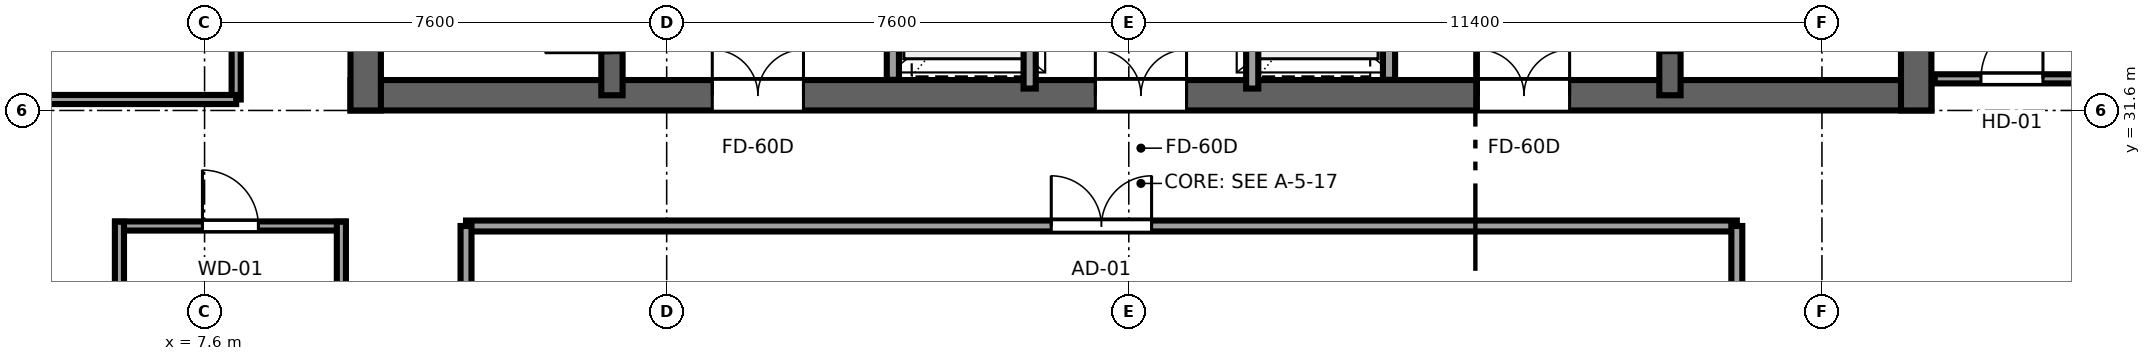
"""IFC4 building model, lengths in metres.
Left out: names, types, materials, properties, quantities, classifications, styles, units other than length and angle.
Written with IfcOpenShell. Run it as: python <this file> out.ifc"""

import sys

from ifc_helpers import new_model, si_unit, direction, frame, frame_2d, origin, place, context, subcontext, project, spatial, rectangle, extrude, source, transform, mapped, element, fill, save


model = new_model("IFC4")
c1 = context("Model", 3, precision=1e-05, world=origin(), true_north=direction((0.0, 1.0)))
c2 = subcontext(c1, "Body", "Model", "MODEL_VIEW")
j1 = project(units=[si_unit("LENGTHUNIT", "METRE"), si_unit("PLANEANGLEUNIT", "RADIAN")], contexts=[c1])
p1 = place(None, origin())
s1 = spatial("IfcSite", under=j1, at=p1, CompositionType="ELEMENT")
p2 = place(p1, origin())
s2 = spatial("IfcBuilding", under=s1, at=p2, CompositionType="ELEMENT")
p3 = place(p2, frame((0.0, 0.0, 262.95)))
s3 = spatial("IfcBuildingStorey", under=s2, at=p3, CompositionType="ELEMENT", Elevation=262.95)
p4 = place(p3, frame((10.0, 31.85, 0.0), z_axis=(0.0, 0.0, 1.0), x_axis=(1.0, 0.0, 0.0)))
e1 = element("IfcWall", 1, at=p4, inside=s3, PredefinedType="SHEAR", context=c2, shape_type="SweptSolid", body=[
    extrude(rectangle(XDim=26.0, YDim=0.5, at=frame_2d((13.0, 0.0))), origin(), (0.0, 0.0, 1.0), 3.55),
])
p5 = place(p4, frame((7.45, 0.0, 0.0), z_axis=(0.0, 0.0, 1.0), x_axis=(-1.0, 0.0, 0.0)))
e2 = element("IfcOpeningElement", 2, at=p5, cuts=e1, PredefinedType="OPENING", context=c2, shape_type="SweptSolid", body=[
    extrude(rectangle(XDim=1.5, YDim=2.04, at=frame_2d((0.75, 1.02))), frame((0.0, 0.26, 0.0), z_axis=(0.0, -1.0, 0.0), x_axis=(1.0, 0.0, 0.0)), (0.0, 0.0, 1.0), 0.52),
])
p6 = place(p4, frame((13.75, 0.0, 0.0), z_axis=(0.0, 0.0, 1.0), x_axis=(-1.0, 0.0, 0.0)))
e3 = element("IfcOpeningElement", 3, at=p6, cuts=e1, PredefinedType="OPENING", context=c2, shape_type="SweptSolid", body=[
    extrude(rectangle(XDim=1.5, YDim=2.04, at=frame_2d((0.75, 1.02))), frame((0.0, 0.26, 0.0), z_axis=(0.0, -1.0, 0.0), x_axis=(1.0, 0.0, 0.0)), (0.0, 0.0, 1.0), 0.52),
])
p7 = place(p4, frame((20.05, 0.0, 0.0), z_axis=(0.0, 0.0, 1.0), x_axis=(-1.0, 0.0, 0.0)))
e4 = element("IfcOpeningElement", 4, at=p7, cuts=e1, PredefinedType="OPENING", context=c2, shape_type="SweptSolid", body=[
    extrude(rectangle(XDim=1.5, YDim=2.04, at=frame_2d((0.75, 1.02))), frame((0.0, 0.26, 0.0), z_axis=(0.0, -1.0, 0.0), x_axis=(1.0, 0.0, 0.0)), (0.0, 0.0, 1.0), 0.52),
])
for number, where, z_axis, x_axis in (
    (5, (10.25, 31.6, 0.0), (0.0, 0.0, 1.0), (0.0, 1.0, 0.0)),
    (6, (35.75, 31.6, 0.0), (0.0, 0.0, 1.0), (0.0, 1.0, 0.0)),
):
    element("IfcWall", number, at=place(p3, frame(where, z_axis=z_axis, x_axis=x_axis)), inside=s3, PredefinedType="SHEAR", context=c2, shape_type="SweptSolid", body=[
        extrude(rectangle(XDim=13.6, YDim=0.5, at=frame_2d((6.8, 0.0))), origin(), (0.0, 0.0, 1.0), 3.55),
    ])
p8 = place(p3, frame((14.3, 31.85, 0.0), z_axis=(0.0, 0.0, 1.0), x_axis=(0.0, 1.0, 0.0)))
e7 = element("IfcWall", 7, at=p8, inside=s3, PredefinedType="SHEAR", context=c2, shape_type="SweptSolid", body=[
    extrude(rectangle(XDim=13.1, YDim=0.35, at=frame_2d((6.55, 0.0))), origin(), (0.0, 0.0, 1.0), 3.55),
])
p9 = place(p8, frame((0.7, 0.0, 0.0)))
e8 = element("IfcOpeningElement", 8, at=p9, cuts=e7, PredefinedType="OPENING", context=c2, shape_type="SweptSolid", body=[
    extrude(rectangle(XDim=1.1, YDim=2.12, at=frame_2d((0.55, 1.06))), frame((0.0, 0.185, 0.0), z_axis=(0.0, -1.0, 0.0), x_axis=(1.0, 0.0, 0.0)), (0.0, 0.0, 1.0), 0.37),
])
p10 = place(p3, frame((31.7, 31.85, 0.0), z_axis=(0.0, 0.0, 1.0), x_axis=(0.0, 1.0, 0.0)))
e9 = element("IfcWall", 9, at=p10, inside=s3, PredefinedType="SHEAR", context=c2, shape_type="SweptSolid", body=[
    extrude(rectangle(XDim=13.1, YDim=0.35, at=frame_2d((6.55, 0.0))), origin(), (0.0, 0.0, 1.0), 3.55),
])
p11 = place(p10, frame((1.8, 0.0, 0.0), z_axis=(0.0, 0.0, 1.0), x_axis=(-1.0, 0.0, 0.0)))
e10 = element("IfcOpeningElement", 10, at=p11, cuts=e9, PredefinedType="OPENING", context=c2, shape_type="SweptSolid", body=[
    extrude(rectangle(XDim=1.1, YDim=2.12, at=frame_2d((0.55, 1.06))), frame((0.0, 0.185, 0.0), z_axis=(0.0, -1.0, 0.0), x_axis=(1.0, 0.0, 0.0)), (0.0, 0.0, 1.0), 0.37),
])
for number, where, z_axis, x_axis in (
    (11, (18.92, 32.104, 0.0), (0.0, 0.0, 1.0), (0.0, 1.0, 0.0)),
    (12, (27.08, 32.104, 0.0), (0.0, 0.0, 1.0), (0.0, 1.0, 0.0)),
):
    element("IfcWall", number, at=place(p3, frame(where, z_axis=z_axis, x_axis=x_axis)), inside=s3, PredefinedType="SOLIDWALL", context=c2, shape_type="SweptSolid", body=[
        extrude(rectangle(XDim=4.046, YDim=0.2, at=frame_2d((2.023, 0.0))), origin(), (0.0, 0.0, 1.0), 3.37),
    ])
p12 = place(p3, frame((21.17, 31.96, 0.0), z_axis=(0.0, 0.0, 1.0), x_axis=(0.0, 1.0, 0.0)))
e13 = element("IfcWall", 13, at=p12, inside=s3, PredefinedType="SOLIDWALL", context=c2, shape_type="SweptSolid", body=[
    extrude(rectangle(XDim=5.08, YDim=0.2, at=frame_2d((2.54, 0.0))), origin(), (0.0, 0.0, 1.0), 3.37),
])
p13 = place(p12, frame((0.74, 0.0, 0.0)))
e14 = element("IfcOpeningElement", 14, at=p13, cuts=e13, PredefinedType="OPENING", context=c2, shape_type="SweptSolid", body=[
    extrude(rectangle(XDim=1.1, YDim=2.12, at=frame_2d((0.55, 1.06))), frame((0.0, 0.11, 0.0), z_axis=(0.0, -1.0, 0.0), x_axis=(1.0, 0.0, 0.0)), (0.0, 0.0, 1.0), 0.22),
])
p14 = place(p12, frame((3.24, 0.0, 0.0)))
e15 = element("IfcOpeningElement", 15, at=p14, cuts=e13, PredefinedType="OPENING", context=c2, shape_type="SweptSolid", body=[
    extrude(rectangle(XDim=1.1, YDim=2.12, at=frame_2d((0.55, 1.06))), frame((0.0, 0.11, 0.0), z_axis=(0.0, -1.0, 0.0), x_axis=(1.0, 0.0, 0.0)), (0.0, 0.0, 1.0), 0.22),
])
p15 = place(p3, frame((24.83, 31.96, 0.0), z_axis=(0.0, 0.0, 1.0), x_axis=(0.0, 1.0, 0.0)))
e16 = element("IfcWall", 16, at=p15, inside=s3, PredefinedType="SOLIDWALL", context=c2, shape_type="SweptSolid", body=[
    extrude(rectangle(XDim=5.08, YDim=0.2, at=frame_2d((2.54, 0.0))), origin(), (0.0, 0.0, 1.0), 3.37),
])
p16 = place(p15, frame((0.74, 0.0, 0.0)))
e17 = element("IfcOpeningElement", 17, at=p16, cuts=e16, PredefinedType="OPENING", context=c2, shape_type="SweptSolid", body=[
    extrude(rectangle(XDim=1.1, YDim=2.12, at=frame_2d((0.55, 1.06))), frame((0.0, 0.11, 0.0), z_axis=(0.0, -1.0, 0.0), x_axis=(1.0, 0.0, 0.0)), (0.0, 0.0, 1.0), 0.22),
])
p17 = place(p15, frame((3.24, 0.0, 0.0)))
e18 = element("IfcOpeningElement", 18, at=p17, cuts=e16, PredefinedType="OPENING", context=c2, shape_type="SweptSolid", body=[
    extrude(rectangle(XDim=1.1, YDim=2.12, at=frame_2d((0.55, 1.06))), frame((0.0, 0.11, 0.0), z_axis=(0.0, -1.0, 0.0), x_axis=(1.0, 0.0, 0.0)), (0.0, 0.0, 1.0), 0.22),
])
p18 = place(p3, frame((11.9, 29.7, 0.0), z_axis=(0.0, 0.0, 1.0), x_axis=(1.0, 0.0, 0.0)))
e19 = element("IfcWall", 19, at=p18, inside=s3, PredefinedType="PARTITIONING", context=c2, shape_type="SweptSolid", body=[
    extrude(rectangle(XDim=20.9, YDim=0.18, at=frame_2d((10.45, 0.0))), origin(), (0.0, 0.0, 1.0), 3.37),
])
p19 = place(p18, frame((9.625, 0.0, 0.0)))
e20 = element("IfcOpeningElement", 20, at=p19, cuts=e19, PredefinedType="OPENING", context=c2, shape_type="SweptSolid", body=[
    extrude(rectangle(XDim=1.65, YDim=2.15, at=frame_2d((0.825, 1.075))), frame((0.0, 0.1, 0.0), z_axis=(0.0, -1.0, 0.0), x_axis=(1.0, 0.0, 0.0)), (0.0, 0.0, 1.0), 0.2),
])
p20 = place(p3, frame((11.9, 26.2, 0.0), z_axis=(0.0, 0.0, 1.0), x_axis=(0.0, 1.0, 0.0)))
e21 = element("IfcWall", 21, at=p20, inside=s3, PredefinedType="PARTITIONING", context=c2, shape_type="SweptSolid", body=[
    extrude(rectangle(XDim=3.5, YDim=0.18, at=frame_2d((1.75, 0.0))), origin(), (0.0, 0.0, 1.0), 3.37),
])
p21 = place(p3, frame((32.8, 26.2, 0.0), z_axis=(0.0, 0.0, 1.0), x_axis=(0.0, 1.0, 0.0)))
e22 = element("IfcWall", 22, at=p21, inside=s3, PredefinedType="PARTITIONING", context=c2, shape_type="SweptSolid", body=[
    extrude(rectangle(XDim=3.5, YDim=0.18, at=frame_2d((1.75, 0.0))), origin(), (0.0, 0.0, 1.0), 2.827),
])
p22 = place(p3, frame((6.13, 29.7, 0.0), z_axis=(0.0, 0.0, 1.0), x_axis=(1.0, 0.0, 0.0)))
e23 = element("IfcWall", 23, at=p22, inside=s3, PredefinedType="PARTITIONING", context=c2, shape_type="SweptSolid", body=[
    extrude(rectangle(XDim=3.79, YDim=0.15, at=frame_2d((1.895, 0.0))), origin(), (0.0, 0.0, 1.0), 3.37),
])
p23 = place(p22, frame((1.435, 0.0, 0.0)))
e24 = element("IfcOpeningElement", 24, at=p23, cuts=e23, PredefinedType="OPENING", context=c2, shape_type="SweptSolid", body=[
    extrude(rectangle(XDim=0.92, YDim=2.01, at=frame_2d((0.46, 1.005))), frame((0.0, 0.085, 0.0), z_axis=(0.0, -1.0, 0.0), x_axis=(1.0, 0.0, 0.0)), (0.0, 0.0, 1.0), 0.17),
])
for number, where, z_axis, x_axis in (
    (25, (6.2, 26.43, 0.0), (0.0, 0.0, 1.0), (0.0, 1.0, 0.0)),
    (26, (9.85, 26.43, 0.0), (0.0, 0.0, 1.0), (0.0, 1.0, 0.0)),
):
    element("IfcWall", number, at=place(p3, frame(where, z_axis=z_axis, x_axis=x_axis)), inside=s3, PredefinedType="PARTITIONING", context=c2, shape_type="SweptSolid", body=[
        extrude(rectangle(XDim=3.34, YDim=0.15, at=frame_2d((1.67, 0.0))), origin(), (0.0, 0.0, 1.0), 3.37),
    ])
p24 = place(p3, frame((8.12, 31.78, 0.0), z_axis=(0.0, 0.0, 1.0), x_axis=(0.0, 1.0, 0.0)))
e27 = element("IfcWall", 27, at=p24, inside=s3, PredefinedType="PARTITIONING", context=c2, shape_type="SweptSolid", body=[
    extrude(rectangle(XDim=4.01, YDim=0.15, at=frame_2d((2.005, 0.0))), origin(), (0.0, 0.0, 1.0), 3.37),
])
p25 = place(p24, frame((1.375, 0.0, 0.0)))
e28 = element("IfcOpeningElement", 28, at=p25, cuts=e27, PredefinedType="OPENING", context=c2, shape_type="SweptSolid", body=[
    extrude(rectangle(XDim=1.22, YDim=2.08, at=frame_2d((0.61, 1.04))), frame((0.0, 0.085, 0.0), z_axis=(0.0, -1.0, 0.0), x_axis=(1.0, 0.0, 0.0)), (0.0, 0.0, 1.0), 0.17),
])
p26 = place(p3, frame((3.005, 31.78, 0.0), z_axis=(0.0, 0.0, 1.0), x_axis=(1.0, 0.0, 0.0)))
e29 = element("IfcWall", 29, at=p26, inside=s3, PredefinedType="PARTITIONING", context=c2, shape_type="SweptSolid", body=[
    extrude(rectangle(XDim=5.115, YDim=0.15, at=frame_2d((2.558, 0.0))), origin(), (0.0, 0.0, 1.0), 3.37),
])
p27 = place(p3, frame((36.055, 32.12, 0.0), z_axis=(0.0, 0.0, 1.0), x_axis=(1.0, 0.0, 0.0)))
e30 = element("IfcWall", 30, at=p27, inside=s3, PredefinedType="PARTITIONING", context=c2, shape_type="SweptSolid", body=[
    extrude(rectangle(XDim=2.54, YDim=0.15, at=frame_2d((1.27, 0.0))), origin(), (0.0, 0.0, 1.0), 3.37),
])
p28 = place(p27, frame((0.76, 0.0, 0.0)))
e31 = element("IfcOpeningElement", 31, at=p28, cuts=e30, PredefinedType="OPENING", context=c2, shape_type="SweptSolid", body=[
    extrude(rectangle(XDim=1.02, YDim=2.03, at=frame_2d((0.51, 1.015))), frame((0.0, 0.085, 0.0), z_axis=(0.0, -1.0, 0.0), x_axis=(1.0, 0.0, 0.0)), (0.0, 0.0, 1.0), 0.17),
])
m1 = source(origin(), c2, "Body", "SweptSolid", [
    extrude(rectangle(XDim=1.1, YDim=2.12, at=frame_2d((0.55, 1.06))), frame((0.0, 0.025, 0.0), z_axis=(0.0, -1.0, 0.0), x_axis=(1.0, 0.0, 0.0)), (0.0, 0.0, 1.0), 0.05),
])
p29 = place(p9, origin())
e32 = element("IfcDoor", 32, at=p29, inside=s3, OperationType="SINGLE_SWING_LEFT", PredefinedType="DOOR", context=c2, shape_type="MappedRepresentation", body=[
    mapped(m1, transform((0.0, 0.0, 0.0), x_axis=(1.0, 0.0, 0.0), y_axis=(0.0, 1.0, 0.0), z_axis=(0.0, 0.0, 1.0), scale=1.0)),
])
fill(e8, e32)
p30 = place(p11, origin())
e33 = element("IfcDoor", 33, at=p30, inside=s3, OperationType="SINGLE_SWING_RIGHT", PredefinedType="DOOR", context=c2, shape_type="MappedRepresentation", body=[
    mapped(m1, transform((0.0, 0.0, 0.0), x_axis=(1.0, 0.0, 0.0), y_axis=(0.0, 1.0, 0.0), z_axis=(0.0, 0.0, 1.0), scale=1.0)),
])
fill(e10, e33)
m2 = source(origin(), c2, "Body", "SweptSolid", [
    extrude(rectangle(XDim=1.5, YDim=2.04, at=frame_2d((0.75, 1.02))), frame((0.0, 0.025, 0.0), z_axis=(0.0, -1.0, 0.0), x_axis=(1.0, 0.0, 0.0)), (0.0, 0.0, 1.0), 0.05),
])
p31 = place(p5, origin())
e34 = element("IfcDoor", 34, at=p31, inside=s3, OperationType="DOUBLE_DOOR_SINGLE_SWING", PredefinedType="DOOR", context=c2, shape_type="MappedRepresentation", body=[
    mapped(m2, transform((0.0, 0.0, 0.0), x_axis=(1.0, 0.0, 0.0), y_axis=(0.0, 1.0, 0.0), z_axis=(0.0, 0.0, 1.0), scale=1.0)),
])
fill(e2, e34)
p32 = place(p6, origin())
e35 = element("IfcDoor", 35, at=p32, inside=s3, OperationType="DOUBLE_DOOR_SINGLE_SWING", PredefinedType="DOOR", context=c2, shape_type="MappedRepresentation", body=[
    mapped(m2, transform((0.0, 0.0, 0.0), x_axis=(1.0, 0.0, 0.0), y_axis=(0.0, 1.0, 0.0), z_axis=(0.0, 0.0, 1.0), scale=1.0)),
])
fill(e3, e35)
p33 = place(p7, origin())
e36 = element("IfcDoor", 36, at=p33, inside=s3, OperationType="DOUBLE_DOOR_SINGLE_SWING", PredefinedType="DOOR", context=c2, shape_type="MappedRepresentation", body=[
    mapped(m2, transform((0.0, 0.0, 0.0), x_axis=(1.0, 0.0, 0.0), y_axis=(0.0, 1.0, 0.0), z_axis=(0.0, 0.0, 1.0), scale=1.0)),
])
fill(e4, e36)
m3 = source(origin(), c2, "Body", "SweptSolid", [
    extrude(rectangle(XDim=1.65, YDim=2.15, at=frame_2d((0.825, 1.075))), frame((0.0, 0.025, 0.0), z_axis=(0.0, -1.0, 0.0), x_axis=(1.0, 0.0, 0.0)), (0.0, 0.0, 1.0), 0.05),
])
p34 = place(p19, origin())
e37 = element("IfcDoor", 37, at=p34, inside=s3, OperationType="DOUBLE_DOOR_SINGLE_SWING", PredefinedType="DOOR", context=c2, shape_type="MappedRepresentation", body=[
    mapped(m3, transform((0.0, 0.0, 0.0), x_axis=(1.0, 0.0, 0.0), y_axis=(0.0, 1.0, 0.0), z_axis=(0.0, 0.0, 1.0), scale=1.0)),
])
fill(e20, e37)
m4 = source(origin(), c2, "Body", "SweptSolid", [
    extrude(rectangle(XDim=0.92, YDim=2.01, at=frame_2d((0.46, 1.005))), frame((0.0, 0.025, 0.0), z_axis=(0.0, -1.0, 0.0), x_axis=(1.0, 0.0, 0.0)), (0.0, 0.0, 1.0), 0.05),
])
p35 = place(p23, origin())
e38 = element("IfcDoor", 38, at=p35, inside=s3, OperationType="SINGLE_SWING_LEFT", PredefinedType="DOOR", context=c2, shape_type="MappedRepresentation", body=[
    mapped(m4, transform((0.0, 0.0, 0.0), x_axis=(1.0, 0.0, 0.0), y_axis=(0.0, 1.0, 0.0), z_axis=(0.0, 0.0, 1.0), scale=1.0)),
])
fill(e24, e38)
m5 = source(origin(), c2, "Body", "SweptSolid", [
    extrude(rectangle(XDim=1.02, YDim=2.03, at=frame_2d((0.51, 1.015))), frame((0.0, 0.025, 0.0), z_axis=(0.0, -1.0, 0.0), x_axis=(1.0, 0.0, 0.0)), (0.0, 0.0, 1.0), 0.05),
])
p36 = place(p28, origin())
e39 = element("IfcDoor", 39, at=p36, inside=s3, OperationType="SINGLE_SWING_RIGHT", PredefinedType="DOOR", context=c2, shape_type="MappedRepresentation", body=[
    mapped(m5, transform((0.0, 0.0, 0.0), x_axis=(1.0, 0.0, 0.0), y_axis=(0.0, 1.0, 0.0), z_axis=(0.0, 0.0, 1.0), scale=1.0)),
])
fill(e31, e39)
save(model, sys.argv[1])
